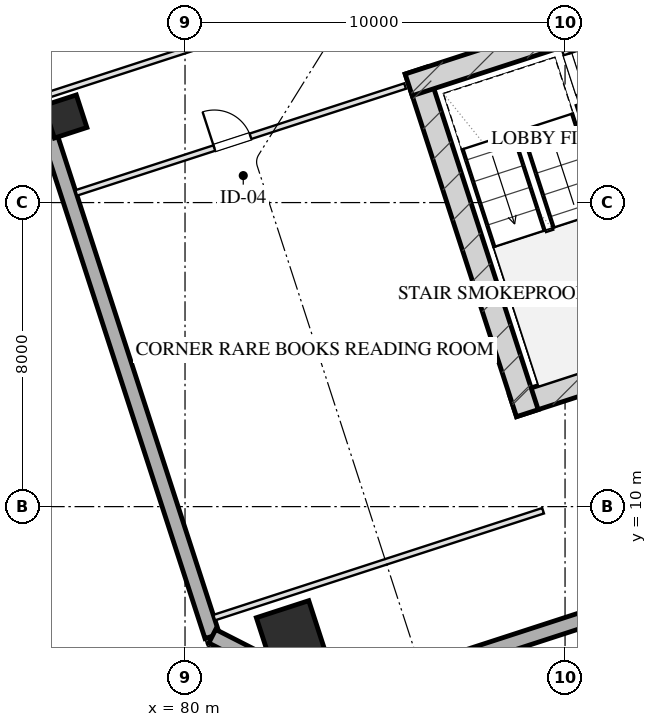
"""IFC4 building model, lengths in metres.
Left out: names, types, materials, properties, quantities, classifications, styles, units other than length and angle.
Written with IfcOpenShell. Run it as: python <this file> out.ifc"""

import sys

from ifc_helpers import new_model, si_unit, direction, frame, frame_2d, origin, origin_2d, place, context, subcontext, project, spatial, rectangle, hollow_rectangle, extrude, element, fill, save


model = new_model("IFC4")
c1 = context("Model", 3, precision=1e-05, world=origin(), true_north=direction((0.0, 1.0)))
c2 = subcontext(c1, "Body", "Model", "MODEL_VIEW")
j1 = project(units=[si_unit("LENGTHUNIT", "METRE"), si_unit("PLANEANGLEUNIT", "RADIAN")], contexts=[c1])
p1 = place(None, origin())
s1 = spatial("IfcSite", under=j1, at=p1, CompositionType="ELEMENT")
p2 = place(p1, origin())
s2 = spatial("IfcBuilding", under=s1, at=p2, CompositionType="ELEMENT")
p3 = place(p2, frame((0.0, 0.0, 96.6)))
s3 = spatial("IfcBuildingStorey", under=s2, at=p3, CompositionType="ELEMENT", Elevation=96.6)
p4 = place(p3, frame((88.63, 12.652, 0.0), z_axis=(0.0, 0.0, 1.0), x_axis=(0.95105714907, 0.309015046886, 0.0)))
e1 = element("IfcWall", 1, at=p4, inside=s3, PredefinedType="SHEAR", context=c2, shape_type="SweptSolid", body=[
    extrude(rectangle(XDim=16.4, YDim=0.6, at=frame_2d((8.2, 0.0))), origin(), (0.0, 0.0, 1.0), 3.45),
])
p5 = place(p3, frame((86.078, 21.475, 0.0), z_axis=(0.0, 0.0, 1.0), x_axis=(0.309017938678, -0.951056209472, 0.0)))
e2 = element("IfcWall", 2, at=p5, inside=s3, PredefinedType="SHEAR", context=c2, shape_type="SweptSolid", body=[
    extrude(rectangle(XDim=9.48, YDim=0.6, at=frame_2d((4.74, 0.0))), origin(), (0.0, 0.0, 1.0), 3.45),
])
p6 = place(p3, frame((85.886, 21.097, 0.0), z_axis=(0.0, 0.0, 1.0), x_axis=(0.951068073652, 0.308981422225, 0.0)))
e3 = element("IfcWall", 3, at=p6, inside=s3, PredefinedType="SHEAR", context=c2, shape_type="SweptSolid", body=[
    extrude(rectangle(XDim=4.22, YDim=0.6, at=frame_2d((2.11, 0.0))), origin(), (0.0, 0.0, 1.0), 3.45),
])
p7 = place(p3, frame((82.791, 6.612, 0.0), z_axis=(0.0, 0.0, 1.0), x_axis=(0.951056516295, 0.309016994375, 0.0)))
e4 = element("IfcColumn", 4, at=p7, inside=s3, PredefinedType="COLUMN", context=c2, shape_type="SweptSolid", body=[
    extrude(hollow_rectangle(XDim=1.45, YDim=1.45, WallThickness=0.05, at=origin_2d()), origin(), (0.0, 0.0, 1.0), 3.451),
])
p8 = place(p3, frame((76.851, 20.264, 0.0), z_axis=(0.0, 0.0, 1.0), x_axis=(0.951056516295, 0.309016994375, 0.0)))
e5 = element("IfcColumn", 5, at=p8, inside=s3, PredefinedType="COLUMN", context=c2, shape_type="SweptSolid", body=[
    extrude(hollow_rectangle(XDim=0.9, YDim=0.9, WallThickness=0.032, at=origin_2d()), origin(), (0.0, 0.0, 1.0), 3.451),
])
p9 = place(p3, frame((80.716, 6.59, 0.0), z_axis=(0.0, 0.0, 1.0), x_axis=(-0.309017542002, 0.95105633836, 0.0)))
e6 = element("IfcWall", 6, at=p9, inside=s3, PredefinedType="SOLIDWALL", context=c2, shape_type="SweptSolid", body=[
    extrude(rectangle(XDim=46.4, YDim=0.4, at=frame_2d((23.2, 0.0))), origin(), (0.0, 0.0, 1.0), 2.55),
])
p10 = place(p9, frame((15.6, 0.0, 0.75)))
e7 = element("IfcOpeningElement", 7, at=p10, cuts=e6, PredefinedType="OPENING", context=c2, shape_type="SweptSolid", body=[
    extrude(rectangle(XDim=2.4, YDim=1.4, at=frame_2d((1.2, 0.7))), frame((0.0, 0.21, 0.0), z_axis=(0.0, -1.0, 0.0), x_axis=(1.0, 0.0, 0.0)), (0.0, 0.0, 1.0), 0.42),
])
p11 = place(p9, frame((19.4, 0.0, 0.75)))
e8 = element("IfcOpeningElement", 8, at=p11, cuts=e6, PredefinedType="OPENING", context=c2, shape_type="SweptSolid", body=[
    extrude(rectangle(XDim=2.4, YDim=1.4, at=frame_2d((1.2, 0.7))), frame((0.0, 0.21, 0.0), z_axis=(0.0, -1.0, 0.0), x_axis=(1.0, 0.0, 0.0)), (0.0, 0.0, 1.0), 0.42),
])
p12 = place(p9, frame((24.6, 0.0, 0.75)))
e9 = element("IfcOpeningElement", 9, at=p12, cuts=e6, PredefinedType="OPENING", context=c2, shape_type="SweptSolid", body=[
    extrude(rectangle(XDim=2.4, YDim=1.4, at=frame_2d((1.2, 0.7))), frame((0.0, 0.21, 0.0), z_axis=(0.0, -1.0, 0.0), x_axis=(1.0, 0.0, 0.0)), (0.0, 0.0, 1.0), 0.42),
])
p13 = place(p9, frame((28.4, 0.0, 0.75)))
e10 = element("IfcOpeningElement", 10, at=p13, cuts=e6, PredefinedType="OPENING", context=c2, shape_type="SweptSolid", body=[
    extrude(rectangle(XDim=2.4, YDim=1.4, at=frame_2d((1.2, 0.7))), frame((0.0, 0.21, 0.0), z_axis=(0.0, -1.0, 0.0), x_axis=(1.0, 0.0, 0.0)), (0.0, 0.0, 1.0), 0.42),
])
p14 = place(p3, frame((111.953, 14.005, 0.0), z_axis=(0.0, 0.0, 1.0), x_axis=(-0.95105505922, -0.309021478754, 0.0)))
e11 = element("IfcWall", 11, at=p14, inside=s3, PredefinedType="SOLIDWALL", context=c2, shape_type="SweptSolid", body=[
    extrude(rectangle(XDim=29.4, YDim=0.4, at=frame_2d((14.7, 0.0))), origin(), (0.0, 0.0, 1.0), 2.55),
])
p15 = place(p3, frame((83.992, 4.92, 0.0), z_axis=(0.0, 0.0, 1.0), x_axis=(-0.891001999643, 0.45399937955, 0.0)))
e12 = element("IfcWall", 12, at=p15, inside=s3, PredefinedType="SOLIDWALL", context=c2, shape_type="SweptSolid", body=[
    extrude(rectangle(XDim=3.677, YDim=0.4, at=frame_2d((1.839, 0.0))), origin(), (0.0, 0.0, 1.0), 2.55),
])
p16 = place(p3, frame((89.899, 22.401, 0.0), z_axis=(0.0, 0.0, 1.0), x_axis=(0.308932062672, -0.951084108086, 0.0)))
e13 = element("IfcWall", 13, at=p16, inside=s3, PredefinedType="PARTITIONING", context=c2, shape_type="SweptSolid", body=[
    extrude(rectangle(XDim=1.9, YDim=0.2, at=frame_2d((0.95, 0.0))), origin(), (0.0, 0.0, 1.0), 3.155),
])
p17 = place(p16, frame((0.52, 0.0, 0.0)))
e14 = element("IfcOpeningElement", 14, at=p17, cuts=e13, PredefinedType="OPENING", context=c2, shape_type="SweptSolid", body=[
    extrude(rectangle(XDim=1.1, YDim=2.05, at=frame_2d((0.55, 1.025))), frame((0.0, 0.11, 0.0), z_axis=(0.0, -1.0, 0.0), x_axis=(1.0, 0.0, 0.0)), (0.0, 0.0, 1.0), 0.22),
])
p18 = place(p3, frame((80.767, 7.079, 0.0), z_axis=(0.0, 0.0, 1.0), x_axis=(0.951057133767, 0.309015093986, 0.0)))
e15 = element("IfcWall", 15, at=p18, inside=s3, PredefinedType="PARTITIONING", context=c2, shape_type="SweptSolid", body=[
    extrude(rectangle(XDim=9.1, YDim=0.15, at=frame_2d((4.55, 0.0))), origin(), (0.0, 0.0, 1.0), 3.155),
])
p19 = place(p3, frame((77.136, 18.254, 0.0), z_axis=(0.0, 0.0, 1.0), x_axis=(0.951057133767, 0.309015093986, 0.0)))
e16 = element("IfcWall", 16, at=p19, inside=s3, PredefinedType="PARTITIONING", context=c2, shape_type="SweptSolid", body=[
    extrude(rectangle(XDim=9.1, YDim=0.15, at=frame_2d((4.55, 0.0))), origin(), (0.0, 0.0, 1.0), 3.155),
])
p20 = place(p19, frame((3.822, 0.0, 0.0)))
e17 = element("IfcOpeningElement", 17, at=p20, cuts=e16, PredefinedType="OPENING", context=c2, shape_type="SweptSolid", body=[
    extrude(rectangle(XDim=1.0, YDim=2.05, at=frame_2d((0.5, 1.025))), frame((0.0, 0.085, 0.0), z_axis=(0.0, -1.0, 0.0), x_axis=(1.0, 0.0, 0.0)), (0.0, 0.0, 1.0), 0.17),
])
p21 = place(p3, frame((76.308, 20.803, 0.0), z_axis=(0.0, 0.0, 1.0), x_axis=(0.95105437725, 0.3090235776, 0.0)))
e18 = element("IfcWall", 18, at=p21, inside=s3, PredefinedType="PARTITIONING", context=c2, shape_type="SweptSolid", body=[
    extrude(rectangle(XDim=7.95, YDim=0.15, at=frame_2d((3.975, 0.0))), origin(), (0.0, 0.0, 1.0), 3.155),
])
p22 = place(p17, origin())
e19 = element("IfcDoor", 19, at=p22, inside=s3, OperationType="SINGLE_SWING_LEFT", PredefinedType="DOOR", context=c2, shape_type="SweptSolid", body=[
    extrude(rectangle(XDim=1.1, YDim=2.05, at=frame_2d((0.55, 1.025))), frame((0.0, 0.025, 0.0), z_axis=(0.0, -1.0, 0.0), x_axis=(1.0, 0.0, 0.0)), (0.0, 0.0, 1.0), 0.05),
])
fill(e14, e19)
p23 = place(p20, origin())
e20 = element("IfcDoor", 20, at=p23, inside=s3, OperationType="SINGLE_SWING_LEFT", PredefinedType="DOOR", context=c2, shape_type="SweptSolid", body=[
    extrude(rectangle(XDim=1.0, YDim=2.05, at=frame_2d((0.5, 1.025))), frame((0.0, 0.025, 0.0), z_axis=(0.0, -1.0, 0.0), x_axis=(1.0, 0.0, 0.0)), (0.0, 0.0, 1.0), 0.05),
])
fill(e17, e20)
save(model, sys.argv[1])
